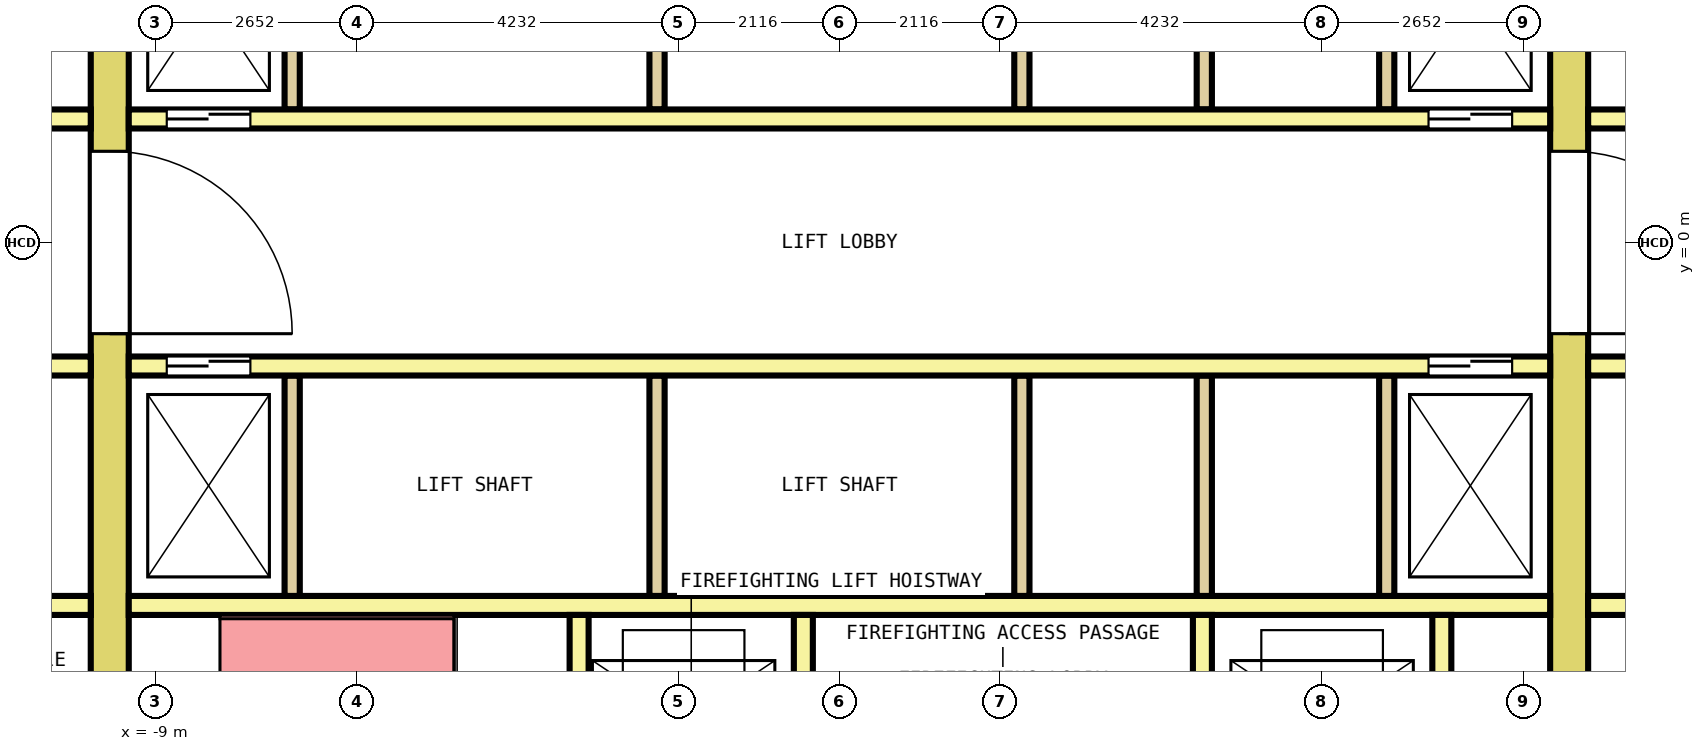
"""IFC4 building model, lengths in metres.
Left out: names, types, materials, properties, quantities, classifications, styles, units other than length and angle.
Written with IfcOpenShell. Run it as: python <this file> out.ifc"""

import sys

from ifc_helpers import new_model, si_unit, direction, frame, frame_2d, origin, place, context, subcontext, project, spatial, rectangle, extrude, element, fill, save


model = new_model("IFC4")
c1 = context("Model", 3, precision=1e-05, world=origin(), true_north=direction((0.0, 1.0)))
c2 = subcontext(c1, "Body", "Model", "MODEL_VIEW")
j1 = project(units=[si_unit("LENGTHUNIT", "METRE"), si_unit("PLANEANGLEUNIT", "RADIAN")], contexts=[c1])
p1 = place(None, origin())
s1 = spatial("IfcSite", under=j1, at=p1, CompositionType="ELEMENT")
p2 = place(p1, origin())
s2 = spatial("IfcBuilding", under=s1, at=p2, CompositionType="ELEMENT")
p3 = place(p2, frame((0.0, 0.0, 89.6)))
s3 = spatial("IfcBuildingStorey", under=s2, at=p3, CompositionType="ELEMENT", Elevation=89.6)
p4 = place(p3, frame((-9.6, -7.7, 0.0), z_axis=(0.0, 0.0, 1.0), x_axis=(0.0, 1.0, 0.0)))
e1 = element("IfcWall", 1, at=p4, inside=s3, PredefinedType="SHEAR", context=c2, shape_type="SweptSolid", body=[
    extrude(rectangle(XDim=15.4, YDim=0.5, at=frame_2d((7.7, 0.0))), origin(), (0.0, 0.0, 1.0), 4.1),
])
p5 = place(p4, frame((6.5, 0.0, 0.0)))
e2 = element("IfcOpeningElement", 2, at=p5, cuts=e1, PredefinedType="OPENING", context=c2, shape_type="SweptSolid", body=[
    extrude(rectangle(XDim=2.4, YDim=2.1, at=frame_2d((1.2, 1.05))), frame((0.0, 0.26, 0.0), z_axis=(0.0, -1.0, 0.0), x_axis=(1.0, 0.0, 0.0)), (0.0, 0.0, 1.0), 0.52),
])
p6 = place(p4, frame((13.4, 0.0, 0.0)))
e3 = element("IfcOpeningElement", 3, at=p6, cuts=e1, PredefinedType="OPENING", context=c2, shape_type="SweptSolid", body=[
    extrude(rectangle(XDim=1.2, YDim=2.1, at=frame_2d((0.6, 1.05))), frame((0.0, 0.26, 0.0), z_axis=(0.0, -1.0, 0.0), x_axis=(1.0, 0.0, 0.0)), (0.0, 0.0, 1.0), 0.52),
])
p7 = place(p4, frame((0.8, 0.0, 0.0)))
e4 = element("IfcOpeningElement", 4, at=p7, cuts=e1, PredefinedType="OPENING", context=c2, shape_type="SweptSolid", body=[
    extrude(rectangle(XDim=1.2, YDim=2.1, at=frame_2d((0.6, 1.05))), frame((0.0, 0.26, 0.0), z_axis=(0.0, -1.0, 0.0), x_axis=(1.0, 0.0, 0.0)), (0.0, 0.0, 1.0), 0.52),
])
p8 = place(p3, frame((9.6, -7.7, 0.0), z_axis=(0.0, 0.0, 1.0), x_axis=(0.0, 1.0, 0.0)))
e5 = element("IfcWall", 5, at=p8, inside=s3, PredefinedType="SHEAR", context=c2, shape_type="SweptSolid", body=[
    extrude(rectangle(XDim=15.4, YDim=0.5, at=frame_2d((7.7, 0.0))), origin(), (0.0, 0.0, 1.0), 4.1),
])
p9 = place(p8, frame((6.5, 0.0, 0.0)))
e6 = element("IfcOpeningElement", 6, at=p9, cuts=e5, PredefinedType="OPENING", context=c2, shape_type="SweptSolid", body=[
    extrude(rectangle(XDim=2.4, YDim=2.1, at=frame_2d((1.2, 1.05))), frame((0.0, 0.26, 0.0), z_axis=(0.0, -1.0, 0.0), x_axis=(1.0, 0.0, 0.0)), (0.0, 0.0, 1.0), 0.52),
])
p10 = place(p8, frame((13.4, 0.0, 0.0)))
e7 = element("IfcOpeningElement", 7, at=p10, cuts=e5, PredefinedType="OPENING", context=c2, shape_type="SweptSolid", body=[
    extrude(rectangle(XDim=1.2, YDim=2.1, at=frame_2d((0.6, 1.05))), frame((0.0, 0.26, 0.0), z_axis=(0.0, -1.0, 0.0), x_axis=(1.0, 0.0, 0.0)), (0.0, 0.0, 1.0), 0.52),
])
p11 = place(p8, frame((0.9, 0.0, 0.0)))
e8 = element("IfcOpeningElement", 8, at=p11, cuts=e5, PredefinedType="OPENING", context=c2, shape_type="SweptSolid", body=[
    extrude(rectangle(XDim=1.0, YDim=2.1, at=frame_2d((0.5, 1.05))), frame((0.0, 0.26, 0.0), z_axis=(0.0, -1.0, 0.0), x_axis=(1.0, 0.0, 0.0)), (0.0, 0.0, 1.0), 0.52),
])
p12 = place(p3, frame((-12.8, 1.625, 0.0), z_axis=(0.0, 0.0, 1.0), x_axis=(1.0, 0.0, 0.0)))
e9 = element("IfcWall", 9, at=p12, inside=s3, PredefinedType="SOLIDWALL", context=c2, shape_type="SweptSolid", body=[
    extrude(rectangle(XDim=2.95, YDim=0.25, at=frame_2d((1.475, 0.0))), origin(), (0.0, 0.0, 1.0), 4.1),
])
p13 = place(p12, frame((0.925, 0.0, 0.0)))
e10 = element("IfcOpeningElement", 10, at=p13, cuts=e9, PredefinedType="OPENING", context=c2, shape_type="SweptSolid", body=[
    extrude(rectangle(XDim=1.1, YDim=2.1, at=frame_2d((0.55, 1.05))), frame((0.0, 0.135, 0.0), z_axis=(0.0, -1.0, 0.0), x_axis=(1.0, 0.0, 0.0)), (0.0, 0.0, 1.0), 0.27),
])
p14 = place(p3, frame((-9.35, 1.625, 0.0), z_axis=(0.0, 0.0, 1.0), x_axis=(1.0, 0.0, 0.0)))
e11 = element("IfcWall", 11, at=p14, inside=s3, PredefinedType="SOLIDWALL", context=c2, shape_type="SweptSolid", body=[
    extrude(rectangle(XDim=18.7, YDim=0.25, at=frame_2d((9.35, 0.0))), origin(), (0.0, 0.0, 1.0), 4.1),
])
p15 = place(p14, frame((0.5, 0.0, 0.0)))
e12 = element("IfcOpeningElement", 12, at=p15, cuts=e11, PredefinedType="OPENING", context=c2, shape_type="SweptSolid", body=[
    extrude(rectangle(XDim=1.1, YDim=2.1, at=frame_2d((0.55, 1.05))), frame((0.0, 0.135, 0.0), z_axis=(0.0, -1.0, 0.0), x_axis=(1.0, 0.0, 0.0)), (0.0, 0.0, 1.0), 0.27),
])
p16 = place(p14, frame((17.1, 0.0, 0.0)))
e13 = element("IfcOpeningElement", 13, at=p16, cuts=e11, PredefinedType="OPENING", context=c2, shape_type="SweptSolid", body=[
    extrude(rectangle(XDim=1.1, YDim=2.1, at=frame_2d((0.55, 1.05))), frame((0.0, 0.135, 0.0), z_axis=(0.0, -1.0, 0.0), x_axis=(1.0, 0.0, 0.0)), (0.0, 0.0, 1.0), 0.27),
])
p17 = place(p3, frame((9.85, 1.625, 0.0), z_axis=(0.0, 0.0, 1.0), x_axis=(1.0, 0.0, 0.0)))
e14 = element("IfcWall", 14, at=p17, inside=s3, PredefinedType="SOLIDWALL", context=c2, shape_type="SweptSolid", body=[
    extrude(rectangle(XDim=2.95, YDim=0.25, at=frame_2d((1.475, 0.0))), origin(), (0.0, 0.0, 1.0), 4.1),
])
p18 = place(p17, frame((0.925, 0.0, 0.0)))
e15 = element("IfcOpeningElement", 15, at=p18, cuts=e14, PredefinedType="OPENING", context=c2, shape_type="SweptSolid", body=[
    extrude(rectangle(XDim=1.1, YDim=2.1, at=frame_2d((0.55, 1.05))), frame((0.0, 0.135, 0.0), z_axis=(0.0, -1.0, 0.0), x_axis=(1.0, 0.0, 0.0)), (0.0, 0.0, 1.0), 0.27),
])
for number, where, z_axis, x_axis in (
    (16, (-7.2, 1.75, 0.0), (0.0, 0.0, 1.0), (0.0, 1.0, 0.0)),
    (17, (-2.4, 1.75, 0.0), (0.0, 0.0, 1.0), (0.0, 1.0, 0.0)),
    (18, (2.4, 1.75, 0.0), (0.0, 0.0, 1.0), (0.0, 1.0, 0.0)),
    (19, (4.8, 1.75, 0.0), (0.0, 0.0, 1.0), (0.0, 1.0, 0.0)),
    (20, (7.2, 1.75, 0.0), (0.0, 0.0, 1.0), (0.0, 1.0, 0.0)),
):
    element("IfcWall", number, at=place(p3, frame(where, z_axis=z_axis, x_axis=x_axis)), inside=s3, PredefinedType="SOLIDWALL", context=c2, shape_type="SweptSolid", body=[
        extrude(rectangle(XDim=2.9, YDim=0.2, at=frame_2d((1.45, 0.0))), origin(), (0.0, 0.0, 1.0), 4.1),
    ])
p19 = place(p3, frame((-12.8, -1.625, 0.0), z_axis=(0.0, 0.0, 1.0), x_axis=(1.0, 0.0, 0.0)))
e21 = element("IfcWall", 21, at=p19, inside=s3, PredefinedType="SOLIDWALL", context=c2, shape_type="SweptSolid", body=[
    extrude(rectangle(XDim=2.95, YDim=0.25, at=frame_2d((1.475, 0.0))), origin(), (0.0, 0.0, 1.0), 4.1),
])
p20 = place(p19, frame((0.925, 0.0, 0.0)))
e22 = element("IfcOpeningElement", 22, at=p20, cuts=e21, PredefinedType="OPENING", context=c2, shape_type="SweptSolid", body=[
    extrude(rectangle(XDim=1.1, YDim=2.1, at=frame_2d((0.55, 1.05))), frame((0.0, 0.135, 0.0), z_axis=(0.0, -1.0, 0.0), x_axis=(1.0, 0.0, 0.0)), (0.0, 0.0, 1.0), 0.27),
])
p21 = place(p3, frame((-9.35, -1.625, 0.0), z_axis=(0.0, 0.0, 1.0), x_axis=(1.0, 0.0, 0.0)))
e23 = element("IfcWall", 23, at=p21, inside=s3, PredefinedType="SOLIDWALL", context=c2, shape_type="SweptSolid", body=[
    extrude(rectangle(XDim=18.7, YDim=0.25, at=frame_2d((9.35, 0.0))), origin(), (0.0, 0.0, 1.0), 4.1),
])
p22 = place(p21, frame((0.5, 0.0, 0.0)))
e24 = element("IfcOpeningElement", 24, at=p22, cuts=e23, PredefinedType="OPENING", context=c2, shape_type="SweptSolid", body=[
    extrude(rectangle(XDim=1.1, YDim=2.1, at=frame_2d((0.55, 1.05))), frame((0.0, 0.135, 0.0), z_axis=(0.0, -1.0, 0.0), x_axis=(1.0, 0.0, 0.0)), (0.0, 0.0, 1.0), 0.27),
])
p23 = place(p21, frame((17.1, 0.0, 0.0)))
e25 = element("IfcOpeningElement", 25, at=p23, cuts=e23, PredefinedType="OPENING", context=c2, shape_type="SweptSolid", body=[
    extrude(rectangle(XDim=1.1, YDim=2.1, at=frame_2d((0.55, 1.05))), frame((0.0, 0.135, 0.0), z_axis=(0.0, -1.0, 0.0), x_axis=(1.0, 0.0, 0.0)), (0.0, 0.0, 1.0), 0.27),
])
p24 = place(p3, frame((9.85, -1.625, 0.0), z_axis=(0.0, 0.0, 1.0), x_axis=(1.0, 0.0, 0.0)))
e26 = element("IfcWall", 26, at=p24, inside=s3, PredefinedType="SOLIDWALL", context=c2, shape_type="SweptSolid", body=[
    extrude(rectangle(XDim=2.95, YDim=0.25, at=frame_2d((1.475, 0.0))), origin(), (0.0, 0.0, 1.0), 4.1),
])
p25 = place(p24, frame((0.925, 0.0, 0.0)))
e27 = element("IfcOpeningElement", 27, at=p25, cuts=e26, PredefinedType="OPENING", context=c2, shape_type="SweptSolid", body=[
    extrude(rectangle(XDim=1.1, YDim=2.1, at=frame_2d((0.55, 1.05))), frame((0.0, 0.135, 0.0), z_axis=(0.0, -1.0, 0.0), x_axis=(1.0, 0.0, 0.0)), (0.0, 0.0, 1.0), 0.27),
])
p26 = place(p3, frame((-12.8, -4.775, 0.0), z_axis=(0.0, 0.0, 1.0), x_axis=(1.0, 0.0, 0.0)))
e28 = element("IfcWall", 28, at=p26, inside=s3, PredefinedType="SOLIDWALL", context=c2, shape_type="SweptSolid", body=[
    extrude(rectangle(XDim=2.95, YDim=0.25, at=frame_2d((1.475, 0.0))), origin(), (0.0, 0.0, 1.0), 4.1),
])
p27 = place(p3, frame((-9.35, -4.775, 0.0), z_axis=(0.0, 0.0, 1.0), x_axis=(1.0, 0.0, 0.0)))
e29 = element("IfcWall", 29, at=p27, inside=s3, PredefinedType="SOLIDWALL", context=c2, shape_type="SweptSolid", body=[
    extrude(rectangle(XDim=18.7, YDim=0.25, at=frame_2d((9.35, 0.0))), origin(), (0.0, 0.0, 1.0), 4.1),
])
p28 = place(p3, frame((9.85, -4.775, 0.0), z_axis=(0.0, 0.0, 1.0), x_axis=(1.0, 0.0, 0.0)))
e30 = element("IfcWall", 30, at=p28, inside=s3, PredefinedType="SOLIDWALL", context=c2, shape_type="SweptSolid", body=[
    extrude(rectangle(XDim=2.95, YDim=0.25, at=frame_2d((1.475, 0.0))), origin(), (0.0, 0.0, 1.0), 4.1),
])
for number, where, z_axis, x_axis in (
    (31, (-7.2, -4.65, 0.0), (0.0, 0.0, 1.0), (0.0, 1.0, 0.0)),
    (32, (-2.4, -4.65, 0.0), (0.0, 0.0, 1.0), (0.0, 1.0, 0.0)),
    (33, (2.4, -4.65, 0.0), (0.0, 0.0, 1.0), (0.0, 1.0, 0.0)),
    (34, (4.8, -4.65, 0.0), (0.0, 0.0, 1.0), (0.0, 1.0, 0.0)),
    (35, (7.2, -4.65, 0.0), (0.0, 0.0, 1.0), (0.0, 1.0, 0.0)),
):
    element("IfcWall", number, at=place(p3, frame(where, z_axis=z_axis, x_axis=x_axis)), inside=s3, PredefinedType="SOLIDWALL", context=c2, shape_type="SweptSolid", body=[
        extrude(rectangle(XDim=2.9, YDim=0.2, at=frame_2d((1.45, 0.0))), origin(), (0.0, 0.0, 1.0), 4.1),
    ])
p29 = place(p3, frame((-3.425, -7.7, 0.0), z_axis=(0.0, 0.0, 1.0), x_axis=(0.0, 1.0, 0.0)))
e36 = element("IfcWall", 36, at=p29, inside=s3, PredefinedType="SOLIDWALL", context=c2, shape_type="SweptSolid", body=[
    extrude(rectangle(XDim=2.8, YDim=0.25, at=frame_2d((1.4, 0.0))), origin(), (0.0, 0.0, 1.0), 4.1),
])
p30 = place(p3, frame((-0.475, -7.7, 0.0), z_axis=(0.0, 0.0, 1.0), x_axis=(0.0, 1.0, 0.0)))
e37 = element("IfcWall", 37, at=p30, inside=s3, PredefinedType="SOLIDWALL", context=c2, shape_type="SweptSolid", body=[
    extrude(rectangle(XDim=2.8, YDim=0.25, at=frame_2d((1.4, 0.0))), origin(), (0.0, 0.0, 1.0), 4.1),
])
p31 = place(p30, frame((0.85, 0.0, 0.0)))
e38 = element("IfcOpeningElement", 38, at=p31, cuts=e37, PredefinedType="OPENING", context=c2, shape_type="SweptSolid", body=[
    extrude(rectangle(XDim=1.1, YDim=2.1, at=frame_2d((0.55, 1.05))), frame((0.0, 0.135, 0.0), z_axis=(0.0, -1.0, 0.0), x_axis=(1.0, 0.0, 0.0)), (0.0, 0.0, 1.0), 0.27),
])
p32 = place(p3, frame((4.775, -7.7, 0.0), z_axis=(0.0, 0.0, 1.0), x_axis=(0.0, 1.0, 0.0)))
e39 = element("IfcWall", 39, at=p32, inside=s3, PredefinedType="SOLIDWALL", context=c2, shape_type="SweptSolid", body=[
    extrude(rectangle(XDim=2.8, YDim=0.25, at=frame_2d((1.4, 0.0))), origin(), (0.0, 0.0, 1.0), 4.1),
])
p33 = place(p32, frame((0.85, 0.0, 0.0)))
e40 = element("IfcOpeningElement", 40, at=p33, cuts=e39, PredefinedType="OPENING", context=c2, shape_type="SweptSolid", body=[
    extrude(rectangle(XDim=1.1, YDim=2.1, at=frame_2d((0.55, 1.05))), frame((0.0, 0.135, 0.0), z_axis=(0.0, -1.0, 0.0), x_axis=(1.0, 0.0, 0.0)), (0.0, 0.0, 1.0), 0.27),
])
p34 = place(p3, frame((7.925, -7.7, 0.0), z_axis=(0.0, 0.0, 1.0), x_axis=(0.0, 1.0, 0.0)))
e41 = element("IfcWall", 41, at=p34, inside=s3, PredefinedType="SOLIDWALL", context=c2, shape_type="SweptSolid", body=[
    extrude(rectangle(XDim=2.8, YDim=0.25, at=frame_2d((1.4, 0.0))), origin(), (0.0, 0.0, 1.0), 4.1),
])
p35 = place(p15, origin())
e42 = element("IfcDoor", 42, at=p35, inside=s3, OperationType="DOUBLE_DOOR_SLIDING", PredefinedType="DOOR", context=c2, shape_type="SweptSolid", body=[
    extrude(rectangle(XDim=1.1, YDim=2.1, at=frame_2d((0.55, 1.05))), frame((0.0, 0.075, 0.0), z_axis=(0.0, -1.0, 0.0), x_axis=(1.0, 0.0, 0.0)), (0.0, 0.0, 1.0), 0.15),
])
fill(e12, e42)
p36 = place(p16, origin())
e43 = element("IfcDoor", 43, at=p36, inside=s3, OperationType="DOUBLE_DOOR_SLIDING", PredefinedType="DOOR", context=c2, shape_type="SweptSolid", body=[
    extrude(rectangle(XDim=1.1, YDim=2.1, at=frame_2d((0.55, 1.05))), frame((0.0, 0.075, 0.0), z_axis=(0.0, -1.0, 0.0), x_axis=(1.0, 0.0, 0.0)), (0.0, 0.0, 1.0), 0.15),
])
fill(e13, e43)
p37 = place(p22, origin())
e44 = element("IfcDoor", 44, at=p37, inside=s3, OperationType="DOUBLE_DOOR_SLIDING", PredefinedType="DOOR", context=c2, shape_type="SweptSolid", body=[
    extrude(rectangle(XDim=1.1, YDim=2.1, at=frame_2d((0.55, 1.05))), frame((0.0, 0.075, 0.0), z_axis=(0.0, -1.0, 0.0), x_axis=(1.0, 0.0, 0.0)), (0.0, 0.0, 1.0), 0.15),
])
fill(e24, e44)
p38 = place(p23, origin())
e45 = element("IfcDoor", 45, at=p38, inside=s3, OperationType="DOUBLE_DOOR_SLIDING", PredefinedType="DOOR", context=c2, shape_type="SweptSolid", body=[
    extrude(rectangle(XDim=1.1, YDim=2.1, at=frame_2d((0.55, 1.05))), frame((0.0, 0.075, 0.0), z_axis=(0.0, -1.0, 0.0), x_axis=(1.0, 0.0, 0.0)), (0.0, 0.0, 1.0), 0.15),
])
fill(e25, e45)
p39 = place(p5, origin())
e46 = element("IfcDoor", 46, at=p39, inside=s3, OperationType="DOUBLE_DOOR_SINGLE_SWING", PredefinedType="DOOR", context=c2, shape_type="SweptSolid", body=[
    extrude(rectangle(XDim=2.4, YDim=2.1, at=frame_2d((1.2, 1.05))), frame((0.0, 0.2, 0.0), z_axis=(0.0, -1.0, 0.0), x_axis=(1.0, 0.0, 0.0)), (0.0, 0.0, 1.0), 0.4),
])
fill(e2, e46)
p40 = place(p9, origin())
e47 = element("IfcDoor", 47, at=p40, inside=s3, OperationType="DOUBLE_DOOR_SINGLE_SWING", PredefinedType="DOOR", context=c2, shape_type="SweptSolid", body=[
    extrude(rectangle(XDim=2.4, YDim=2.1, at=frame_2d((1.2, 1.05))), frame((0.0, 0.2, 0.0), z_axis=(0.0, -1.0, 0.0), x_axis=(1.0, 0.0, 0.0)), (0.0, 0.0, 1.0), 0.4),
])
fill(e6, e47)
save(model, sys.argv[1])
